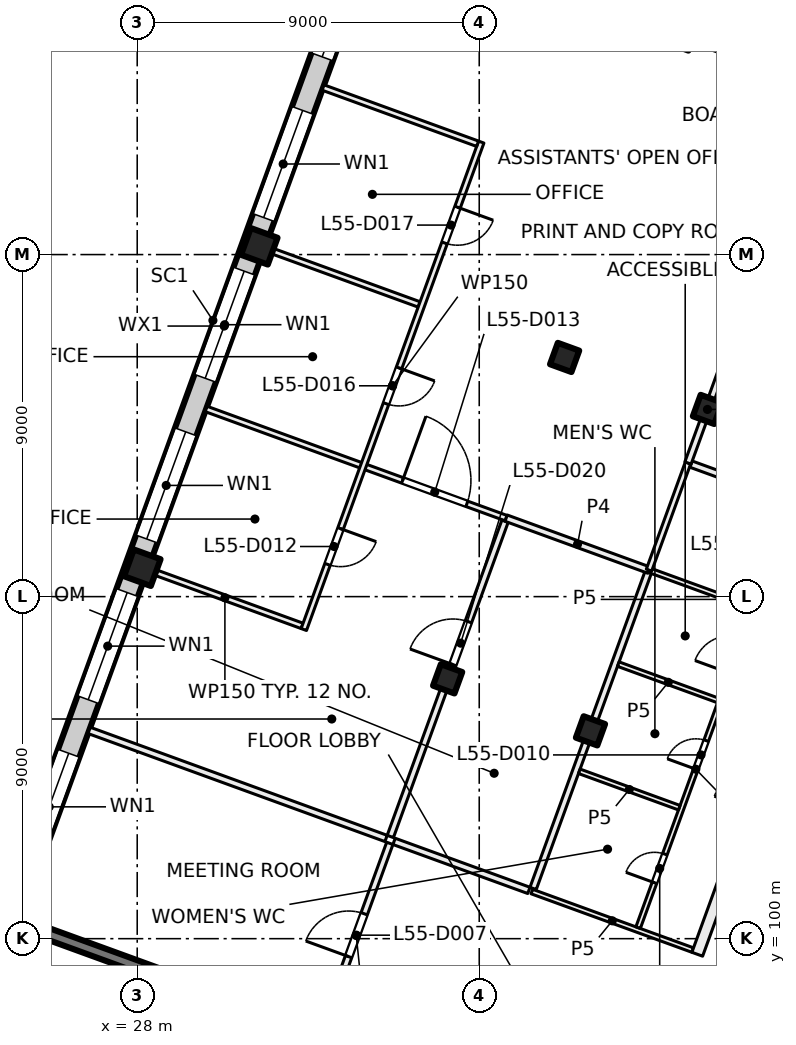
"""IFC4 building model, lengths in metres.
Left out: names, types, materials, properties, quantities, classifications, styles, units other than length and angle.
Written with IfcOpenShell. Run it as: python <this file> out.ifc"""

import sys

from ifc_helpers import new_model, si_unit, direction, frame, frame_2d, origin, origin_2d, place, context, subcontext, project, spatial, rectangle, extrude, element, fill, save


model = new_model("IFC4")
c1 = context("Model", 3, precision=1e-05, world=origin(), true_north=direction((0.0, 1.0)))
c2 = subcontext(c1, "Body", "Model", "MODEL_VIEW")
j1 = project(units=[si_unit("LENGTHUNIT", "METRE"), si_unit("PLANEANGLEUNIT", "RADIAN")], contexts=[c1])
p1 = place(None, origin())
s1 = spatial("IfcSite", under=j1, at=p1, CompositionType="ELEMENT")
p2 = place(p1, origin())
s2 = spatial("IfcBuilding", under=s1, at=p2, CompositionType="ELEMENT")
p3 = place(p2, frame((0.0, 0.0, 232.0)))
s3 = spatial("IfcBuildingStorey", under=s2, at=p3, CompositionType="ELEMENT", Elevation=232.0)
for number, where, z_axis, x_axis in (
    (1, (43.006, 113.925, 0.0), (0.0, 0.0, 1.0), (-0.342, -0.94, 0.0)),
    (2, (39.927, 105.468, 0.0), (0.0, 0.0, 1.0), (-0.342, -0.94, 0.0)),
    (3, (39.247, 115.293, 0.0), (0.0, 0.0, 1.0), (-0.342, -0.94, 0.0)),
    (4, (36.169, 106.836, 0.0), (0.0, 0.0, 1.0), (-0.342, -0.94, 0.0)),
):
    element("IfcColumn", number, at=place(p3, frame(where, z_axis=z_axis, x_axis=x_axis)), inside=s3, PredefinedType="COLUMN", context=c2, shape_type="SweptSolid", body=[
        extrude(rectangle(XDim=0.6, YDim=0.6, at=origin_2d()), origin(), (0.0, 0.0, 1.0), 4.0),
    ])
for number, where, z_axis, x_axis in (
    (5, (31.212, 118.218, 0.0), (0.0, 0.0, 1.0), (-0.342, -0.94, 0.0)),
    (6, (28.134, 109.76, 0.0), (0.0, 0.0, 1.0), (-0.342, -0.94, 0.0)),
):
    element("IfcColumn", number, at=place(p3, frame(where, z_axis=z_axis, x_axis=x_axis)), inside=s3, PredefinedType="COLUMN", context=c2, shape_type="SweptSolid", body=[
        extrude(rectangle(XDim=0.75, YDim=0.75, at=origin_2d()), origin(), (0.0, 0.0, 1.0), 4.0),
    ])
p4 = place(p3, frame((32.971, 97.465, 0.0), z_axis=(0.0, 0.0, 1.0), x_axis=(-0.939695066972, 0.34201342241, 0.0)))
e7 = element("IfcWall", 7, at=p4, inside=s3, PredefinedType="SHEAR", context=c2, shape_type="SweptSolid", body=[
    extrude(rectangle(XDim=8.7, YDim=0.3, at=frame_2d((4.35, 0.0))), origin(), (0.0, 0.0, 1.0), 4.0),
])
p5 = place(p3, frame((24.666, 100.669, 0.0), z_axis=(0.0, 0.0, 1.0), x_axis=(0.34201964167, 0.939692803373, 0.0)))
e8 = element("IfcWall", 8, at=p5, inside=s3, PredefinedType="SOLIDWALL", context=c2, shape_type="SweptSolid", body=[
    extrude(rectangle(XDim=32.884, YDim=0.6, at=frame_2d((16.442, 0.0))), origin(), (0.0, 0.0, 1.0), 3.625),
])
p6 = place(p5, frame((1.48, 0.0, 0.9)))
e9 = element("IfcOpeningElement", 9, at=p6, cuts=e8, PredefinedType="OPENING", context=c2, shape_type="SweptSolid", body=[
    extrude(rectangle(XDim=3.0, YDim=2.4, at=frame_2d((1.5, 1.2))), frame((0.0, 0.31, 0.0), z_axis=(0.0, -1.0, 0.0), x_axis=(1.0, 0.0, 0.0)), (0.0, 0.0, 1.0), 0.62),
])
p7 = place(p5, frame((5.98, 0.0, 0.9)))
e10 = element("IfcOpeningElement", 10, at=p7, cuts=e8, PredefinedType="OPENING", context=c2, shape_type="SweptSolid", body=[
    extrude(rectangle(XDim=3.0, YDim=2.4, at=frame_2d((1.5, 1.2))), frame((0.0, 0.31, 0.0), z_axis=(0.0, -1.0, 0.0), x_axis=(1.0, 0.0, 0.0)), (0.0, 0.0, 1.0), 0.62),
])
p8 = place(p5, frame((10.48, 0.0, 0.9)))
e11 = element("IfcOpeningElement", 11, at=p8, cuts=e8, PredefinedType="OPENING", context=c2, shape_type="SweptSolid", body=[
    extrude(rectangle(XDim=3.0, YDim=2.4, at=frame_2d((1.5, 1.2))), frame((0.0, 0.31, 0.0), z_axis=(0.0, -1.0, 0.0), x_axis=(1.0, 0.0, 0.0)), (0.0, 0.0, 1.0), 0.62),
])
p9 = place(p5, frame((14.98, 0.0, 0.9)))
e12 = element("IfcOpeningElement", 12, at=p9, cuts=e8, PredefinedType="OPENING", context=c2, shape_type="SweptSolid", body=[
    extrude(rectangle(XDim=3.0, YDim=2.4, at=frame_2d((1.5, 1.2))), frame((0.0, 0.31, 0.0), z_axis=(0.0, -1.0, 0.0), x_axis=(1.0, 0.0, 0.0)), (0.0, 0.0, 1.0), 0.62),
])
p10 = place(p5, frame((19.48, 0.0, 0.9)))
e13 = element("IfcOpeningElement", 13, at=p10, cuts=e8, PredefinedType="OPENING", context=c2, shape_type="SweptSolid", body=[
    extrude(rectangle(XDim=3.0, YDim=2.4, at=frame_2d((1.5, 1.2))), frame((0.0, 0.31, 0.0), z_axis=(0.0, -1.0, 0.0), x_axis=(1.0, 0.0, 0.0)), (0.0, 0.0, 1.0), 0.62),
])
p11 = place(p5, frame((23.98, 0.0, 0.9)))
e14 = element("IfcOpeningElement", 14, at=p11, cuts=e8, PredefinedType="OPENING", context=c2, shape_type="SweptSolid", body=[
    extrude(rectangle(XDim=3.0, YDim=2.4, at=frame_2d((1.5, 1.2))), frame((0.0, 0.31, 0.0), z_axis=(0.0, -1.0, 0.0), x_axis=(1.0, 0.0, 0.0)), (0.0, 0.0, 1.0), 0.62),
])
p12 = place(p5, frame((28.48, 0.0, 0.9)))
e15 = element("IfcOpeningElement", 15, at=p12, cuts=e8, PredefinedType="OPENING", context=c2, shape_type="SweptSolid", body=[
    extrude(rectangle(XDim=3.0, YDim=2.4, at=frame_2d((1.5, 1.2))), frame((0.0, 0.31, 0.0), z_axis=(0.0, -1.0, 0.0), x_axis=(1.0, 0.0, 0.0)), (0.0, 0.0, 1.0), 0.62),
])
p13 = place(p3, frame((26.736, 105.48, 0.0), z_axis=(0.0, 0.0, 1.0), x_axis=(0.939705074886, -0.341985924028, 0.0)))
e16 = element("IfcWall", 16, at=p13, inside=s3, PredefinedType="PARTITIONING", context=c2, shape_type="SweptSolid", body=[
    extrude(rectangle(XDim=8.313, YDim=0.175, at=frame_2d((4.157, 0.0))), origin(), (0.0, 0.0, 1.0), 3.625),
])
p14 = place(p3, frame((29.814, 113.938, 0.0), z_axis=(0.0, 0.0, 1.0), x_axis=(0.939698351515, -0.342004397867, 0.0)))
e17 = element("IfcWall", 17, at=p14, inside=s3, PredefinedType="PARTITIONING", context=c2, shape_type="SweptSolid", body=[
    extrude(rectangle(XDim=8.401, YDim=0.15, at=frame_2d((4.2, 0.0))), origin(), (0.0, 0.0, 1.0), 3.625),
])
p15 = place(p14, frame((5.5, 0.0, 0.0)))
e18 = element("IfcOpeningElement", 18, at=p15, cuts=e17, PredefinedType="OPENING", context=c2, shape_type="SweptSolid", body=[
    extrude(rectangle(XDim=1.8, YDim=2.1, at=frame_2d((0.9, 1.05))), frame((0.0, 0.085, 0.0), z_axis=(0.0, -1.0, 0.0), x_axis=(1.0, 0.0, 0.0)), (0.0, 0.0, 1.0), 0.17),
])
p16 = place(p3, frame((31.353, 118.166, 0.0), z_axis=(0.0, 0.0, 1.0), x_axis=(0.939803311208, -0.341715870634, 0.0)))
e19 = element("IfcWall", 19, at=p16, inside=s3, PredefinedType="PARTITIONING", context=c2, shape_type="SweptSolid", body=[
    extrude(rectangle(XDim=4.325, YDim=0.15, at=frame_2d((2.163, 0.0))), origin(), (0.0, 0.0, 1.0), 3.625),
])
p17 = place(p3, frame((32.34, 108.23, 0.0), z_axis=(0.0, 0.0, 1.0), x_axis=(-0.939737385516, 0.341897128188, 0.0)))
e20 = element("IfcWall", 20, at=p17, inside=s3, PredefinedType="PARTITIONING", context=c2, shape_type="SweptSolid", body=[
    extrude(rectangle(XDim=4.326, YDim=0.15, at=frame_2d((2.163, 0.0))), origin(), (0.0, 0.0, 1.0), 3.625),
])
p18 = place(p3, frame((37.053, 120.96, 0.0), z_axis=(0.0, 0.0, 1.0), x_axis=(-0.342064742067, -0.939676386973, 0.0)))
e21 = element("IfcWall", 21, at=p18, inside=s3, PredefinedType="PARTITIONING", context=c2, shape_type="SweptSolid", body=[
    extrude(rectangle(XDim=13.649, YDim=0.15, at=frame_2d((6.825, 0.0))), origin(), (0.0, 0.0, 1.0), 3.625),
])
p19 = place(p18, frame((10.824, 0.0, 0.0)))
e22 = element("IfcOpeningElement", 22, at=p19, cuts=e21, PredefinedType="OPENING", context=c2, shape_type="SweptSolid", body=[
    extrude(rectangle(XDim=1.0, YDim=2.1, at=frame_2d((0.5, 1.05))), frame((0.0, 0.085, 0.0), z_axis=(0.0, -1.0, 0.0), x_axis=(1.0, 0.0, 0.0)), (0.0, 0.0, 1.0), 0.17),
])
p20 = place(p18, frame((6.324, 0.0, 0.0)))
e23 = element("IfcOpeningElement", 23, at=p20, cuts=e21, PredefinedType="OPENING", context=c2, shape_type="SweptSolid", body=[
    extrude(rectangle(XDim=1.0, YDim=2.1, at=frame_2d((0.5, 1.05))), frame((0.0, 0.085, 0.0), z_axis=(0.0, -1.0, 0.0), x_axis=(1.0, 0.0, 0.0)), (0.0, 0.0, 1.0), 0.17),
])
p21 = place(p18, frame((1.824, 0.0, 0.0)))
e24 = element("IfcOpeningElement", 24, at=p21, cuts=e21, PredefinedType="OPENING", context=c2, shape_type="SweptSolid", body=[
    extrude(rectangle(XDim=1.0, YDim=2.1, at=frame_2d((0.5, 1.05))), frame((0.0, 0.085, 0.0), z_axis=(0.0, -1.0, 0.0), x_axis=(1.0, 0.0, 0.0)), (0.0, 0.0, 1.0), 0.17),
])
p22 = place(p3, frame((32.892, 122.395, 0.0), z_axis=(0.0, 0.0, 1.0), x_axis=(0.93973078783, -0.341915262023, 0.0)))
e25 = element("IfcWall", 25, at=p22, inside=s3, PredefinedType="PARTITIONING", context=c2, shape_type="SweptSolid", body=[
    extrude(rectangle(XDim=4.326, YDim=0.15, at=frame_2d((2.163, 0.0))), origin(), (0.0, 0.0, 1.0), 3.625),
])
p23 = place(p3, frame((32.881, 97.657, 0.0), z_axis=(0.0, 0.0, 1.0), x_axis=(0.342058204353, 0.939678766832, 0.0)))
e26 = element("IfcWall", 26, at=p23, inside=s3, PredefinedType="PARTITIONING", context=c2, shape_type="SweptSolid", body=[
    extrude(rectangle(XDim=5.163, YDim=0.175, at=frame_2d((2.581, 0.0))), origin(), (0.0, 0.0, 1.0), 3.625),
])
p24 = place(p23, frame((1.991, 0.0, 0.0)))
e27 = element("IfcOpeningElement", 27, at=p24, cuts=e26, PredefinedType="OPENING", context=c2, shape_type="SweptSolid", body=[
    extrude(rectangle(XDim=1.2, YDim=2.1, at=frame_2d((0.6, 1.05))), frame((0.0, 0.097, 0.0), z_axis=(0.0, -1.0, 0.0), x_axis=(1.0, 0.0, 0.0)), (0.0, 0.0, 1.0), 0.195),
])
p25 = place(p3, frame((34.759, 102.56, 0.0), z_axis=(0.0, 0.0, 1.0), x_axis=(0.939770757411, -0.341805388365, 0.0)))
e28 = element("IfcWall", 28, at=p25, inside=s3, PredefinedType="PARTITIONING", context=c2, shape_type="SweptSolid", body=[
    extrude(rectangle(XDim=3.774, YDim=0.175, at=frame_2d((1.887, 0.0))), origin(), (0.0, 0.0, 1.0), 3.625),
])
p26 = place(p3, frame((34.66, 102.689, 0.0), z_axis=(0.0, 0.0, 1.0), x_axis=(0.341951828534, 0.939717482524, 0.0)))
e29 = element("IfcWall", 29, at=p26, inside=s3, PredefinedType="PARTITIONING", context=c2, shape_type="SweptSolid", body=[
    extrude(rectangle(XDim=8.826, YDim=0.175, at=frame_2d((4.413, 0.0))), origin(), (0.0, 0.0, 1.0), 3.625),
])
p27 = place(p26, frame((4.813, 0.0, 0.0)))
e30 = element("IfcOpeningElement", 30, at=p27, cuts=e29, PredefinedType="OPENING", context=c2, shape_type="SweptSolid", body=[
    extrude(rectangle(XDim=1.2, YDim=2.1, at=frame_2d((0.6, 1.05))), frame((0.0, 0.097, 0.0), z_axis=(0.0, -1.0, 0.0), x_axis=(1.0, 0.0, 0.0)), (0.0, 0.0, 1.0), 0.195),
])
p28 = place(p3, frame((38.385, 101.24, 0.0), z_axis=(0.0, 0.0, 1.0), x_axis=(0.939711088937, -0.341969398235, 0.0)))
e31 = element("IfcWall", 31, at=p28, inside=s3, PredefinedType="PARTITIONING", context=c2, shape_type="SweptSolid", body=[
    extrude(rectangle(XDim=4.503, YDim=0.125, at=frame_2d((2.252, 0.0))), origin(), (0.0, 0.0, 1.0), 3.625),
])
p29 = place(p3, frame((38.418, 101.322, 0.0), z_axis=(0.0, 0.0, 1.0), x_axis=(0.342101536507, 0.939662992099, 0.0)))
e32 = element("IfcWall", 32, at=p29, inside=s3, PredefinedType="PARTITIONING", context=c2, shape_type="SweptSolid", body=[
    extrude(rectangle(XDim=8.913, YDim=0.175, at=frame_2d((4.457, 0.0))), origin(), (0.0, 0.0, 1.0), 3.625),
])
p30 = place(p3, frame((41.181, 100.29, 0.0), z_axis=(0.0, 0.0, 1.0), x_axis=(0.34222012082, 0.939619810831, 0.0)))
e33 = element("IfcWall", 33, at=p30, inside=s3, PredefinedType="PARTITIONING", context=c2, shape_type="SweptSolid", body=[
    extrude(rectangle(XDim=8.875, YDim=0.125, at=frame_2d((4.438, 0.0))), origin(), (0.0, 0.0, 1.0), 3.625),
])
p31 = place(p30, frame((1.258, 0.0, 0.0)))
e34 = element("IfcOpeningElement", 34, at=p31, cuts=e33, PredefinedType="OPENING", context=c2, shape_type="SweptSolid", body=[
    extrude(rectangle(XDim=0.8, YDim=2.1, at=frame_2d((0.4, 1.05))), frame((0.0, 0.073, 0.0), z_axis=(0.0, -1.0, 0.0), x_axis=(1.0, 0.0, 0.0)), (0.0, 0.0, 1.0), 0.145),
])
p32 = place(p30, frame((4.437, 0.0, 0.0)))
e35 = element("IfcOpeningElement", 35, at=p32, cuts=e33, PredefinedType="OPENING", context=c2, shape_type="SweptSolid", body=[
    extrude(rectangle(XDim=0.8, YDim=2.1, at=frame_2d((0.4, 1.05))), frame((0.0, 0.073, 0.0), z_axis=(0.0, -1.0, 0.0), x_axis=(1.0, 0.0, 0.0)), (0.0, 0.0, 1.0), 0.145),
])
p33 = place(p30, frame((7.116, 0.0, 0.0)))
e36 = element("IfcOpeningElement", 36, at=p33, cuts=e33, PredefinedType="OPENING", context=c2, shape_type="SweptSolid", body=[
    extrude(rectangle(XDim=1.0, YDim=2.1, at=frame_2d((0.5, 1.05))), frame((0.0, 0.073, 0.0), z_axis=(0.0, -1.0, 0.0), x_axis=(1.0, 0.0, 0.0)), (0.0, 0.0, 1.0), 0.145),
])
p34 = place(p3, frame((41.467, 109.697, 0.0), z_axis=(0.0, 0.0, 1.0), x_axis=(-0.939713209288, 0.341963571582, 0.0)))
e37 = element("IfcWall", 37, at=p34, inside=s3, PredefinedType="PARTITIONING", context=c2, shape_type="SweptSolid", body=[
    extrude(rectangle(XDim=4.0, YDim=0.175, at=frame_2d((2.0, 0.0))), origin(), (0.0, 0.0, 1.0), 3.625),
])
p35 = place(p3, frame((41.467, 109.697, 0.0), z_axis=(0.0, 0.0, 1.0), x_axis=(0.939609529273, -0.342248349154, 0.0)))
e38 = element("IfcWall", 38, at=p35, inside=s3, PredefinedType="PARTITIONING", context=c2, shape_type="SweptSolid", body=[
    extrude(rectangle(XDim=4.5, YDim=0.125, at=frame_2d((2.25, 0.0))), origin(), (0.0, 0.0, 1.0), 3.625),
])
p36 = place(p3, frame((42.264, 103.446, 0.0), z_axis=(0.0, 0.0, 1.0), x_axis=(-0.939640574808, 0.342163104635, 0.0)))
e39 = element("IfcWall", 39, at=p36, inside=s3, PredefinedType="PARTITIONING", context=c2, shape_type="SweptSolid", body=[
    extrude(rectangle(XDim=2.8, YDim=0.125, at=frame_2d((1.4, 0.0))), origin(), (0.0, 0.0, 1.0), 3.625),
])
p37 = place(p3, frame((42.493, 112.516, 0.0), z_axis=(0.0, 0.0, 1.0), x_axis=(-0.341965219194, -0.939712609717, 0.0)))
e40 = element("IfcWall", 40, at=p37, inside=s3, PredefinedType="PARTITIONING", context=c2, shape_type="SweptSolid", body=[
    extrude(rectangle(XDim=3.0, YDim=0.15, at=frame_2d((1.5, 0.0))), origin(), (0.0, 0.0, 1.0), 3.625),
])
p38 = place(p3, frame((42.575, 112.486, 0.0), z_axis=(0.0, 0.0, 1.0), x_axis=(0.939620446327, -0.342218375959, 0.0)))
e41 = element("IfcWall", 41, at=p38, inside=s3, PredefinedType="PARTITIONING", context=c2, shape_type="SweptSolid", body=[
    extrude(rectangle(XDim=4.412, YDim=0.175, at=frame_2d((2.206, 0.0))), origin(), (0.0, 0.0, 1.0), 3.625),
])
p39 = place(p3, frame((42.737, 99.59, 0.0), z_axis=(0.0, 0.0, 1.0), x_axis=(0.341992703977, 0.939702607438, 0.0)))
e42 = element("IfcWall", 42, at=p39, inside=s3, PredefinedType="PARTITIONING", context=c2, shape_type="SweptSolid", body=[
    extrude(rectangle(XDim=23.006, YDim=0.3, at=frame_2d((11.503, 0.0))), origin(), (0.0, 0.0, 1.0), 3.625),
])
p40 = place(p39, frame((4.062, 0.0, 0.0)))
e43 = element("IfcOpeningElement", 43, at=p40, cuts=e42, PredefinedType="OPENING", context=c2, shape_type="SweptSolid", body=[
    extrude(rectangle(XDim=1.0, YDim=2.1, at=frame_2d((0.5, 1.05))), frame((0.0, 0.16, 0.0), z_axis=(0.0, -1.0, 0.0), x_axis=(1.0, 0.0, 0.0)), (0.0, 0.0, 1.0), 0.32),
])
p41 = place(p39, frame((10.162, 0.0, 0.0)))
e44 = element("IfcOpeningElement", 44, at=p41, cuts=e42, PredefinedType="OPENING", context=c2, shape_type="SweptSolid", body=[
    extrude(rectangle(XDim=0.8, YDim=2.1, at=frame_2d((0.4, 1.05))), frame((0.0, 0.16, 0.0), z_axis=(0.0, -1.0, 0.0), x_axis=(1.0, 0.0, 0.0)), (0.0, 0.0, 1.0), 0.32),
])
p42 = place(p39, frame((13.712, 0.0, 0.0)))
e45 = element("IfcOpeningElement", 45, at=p42, cuts=e42, PredefinedType="OPENING", context=c2, shape_type="SweptSolid", body=[
    extrude(rectangle(XDim=1.2, YDim=2.1, at=frame_2d((0.6, 1.05))), frame((0.0, 0.16, 0.0), z_axis=(0.0, -1.0, 0.0), x_axis=(1.0, 0.0, 0.0)), (0.0, 0.0, 1.0), 0.32),
])
p43 = place(p39, frame((18.662, 0.0, 0.0)))
e46 = element("IfcOpeningElement", 46, at=p43, cuts=e42, PredefinedType="OPENING", context=c2, shape_type="SweptSolid", body=[
    extrude(rectangle(XDim=1.8, YDim=2.1, at=frame_2d((0.9, 1.05))), frame((0.0, 0.16, 0.0), z_axis=(0.0, -1.0, 0.0), x_axis=(1.0, 0.0, 0.0)), (0.0, 0.0, 1.0), 0.32),
])
p44 = place(p3, frame((43.29, 106.266, 0.0), z_axis=(0.0, 0.0, 1.0), x_axis=(-0.939650782256, 0.342135071873, 0.0)))
e47 = element("IfcWall", 47, at=p44, inside=s3, PredefinedType="PARTITIONING", context=c2, shape_type="SweptSolid", body=[
    extrude(rectangle(XDim=2.8, YDim=0.125, at=frame_2d((1.4, 0.0))), origin(), (0.0, 0.0, 1.0), 3.625),
])
p45 = place(p3, frame((44.002, 116.662, 0.0), z_axis=(0.0, 0.0, 1.0), x_axis=(-0.342022951975, -0.939691598517, 0.0)))
e48 = element("IfcWall", 48, at=p45, inside=s3, PredefinedType="PARTITIONING", context=c2, shape_type="SweptSolid", body=[
    extrude(rectangle(XDim=4.412, YDim=0.175, at=frame_2d((2.206, 0.0))), origin(), (0.0, 0.0, 1.0), 3.625),
])
p46 = place(p3, frame((50.311, 120.843, 0.0), z_axis=(0.0, 0.0, 1.0), x_axis=(-0.939664702396, 0.342096838733, 0.0)))
e49 = element("IfcWall", 49, at=p46, inside=s3, PredefinedType="PARTITIONING", context=c2, shape_type="SweptSolid", body=[
    extrude(rectangle(XDim=16.899, YDim=0.15, at=frame_2d((8.449, 0.0))), origin(), (0.0, 0.0, 1.0), 3.625),
])
p47 = place(p6, origin())
e50 = element("IfcWindow", 50, at=p47, inside=s3, PartitioningType="SINGLE_PANEL", PredefinedType="WINDOW", context=c2, shape_type="SweptSolid", body=[
    extrude(rectangle(XDim=3.0, YDim=2.4, at=frame_2d((1.5, 1.2))), frame((0.0, 0.03, 0.0), z_axis=(0.0, -1.0, 0.0), x_axis=(1.0, 0.0, 0.0)), (0.0, 0.0, 1.0), 0.06),
])
fill(e9, e50)
p48 = place(p7, origin())
e51 = element("IfcWindow", 51, at=p48, inside=s3, PartitioningType="SINGLE_PANEL", PredefinedType="WINDOW", context=c2, shape_type="SweptSolid", body=[
    extrude(rectangle(XDim=3.0, YDim=2.4, at=frame_2d((1.5, 1.2))), frame((0.0, 0.03, 0.0), z_axis=(0.0, -1.0, 0.0), x_axis=(1.0, 0.0, 0.0)), (0.0, 0.0, 1.0), 0.06),
])
fill(e10, e51)
p49 = place(p8, origin())
e52 = element("IfcWindow", 52, at=p49, inside=s3, PartitioningType="SINGLE_PANEL", PredefinedType="WINDOW", context=c2, shape_type="SweptSolid", body=[
    extrude(rectangle(XDim=3.0, YDim=2.4, at=frame_2d((1.5, 1.2))), frame((0.0, 0.03, 0.0), z_axis=(0.0, -1.0, 0.0), x_axis=(1.0, 0.0, 0.0)), (0.0, 0.0, 1.0), 0.06),
])
fill(e11, e52)
p50 = place(p9, origin())
e53 = element("IfcWindow", 53, at=p50, inside=s3, PartitioningType="SINGLE_PANEL", PredefinedType="WINDOW", context=c2, shape_type="SweptSolid", body=[
    extrude(rectangle(XDim=3.0, YDim=2.4, at=frame_2d((1.5, 1.2))), frame((0.0, 0.03, 0.0), z_axis=(0.0, -1.0, 0.0), x_axis=(1.0, 0.0, 0.0)), (0.0, 0.0, 1.0), 0.06),
])
fill(e12, e53)
p51 = place(p10, origin())
e54 = element("IfcWindow", 54, at=p51, inside=s3, PartitioningType="SINGLE_PANEL", PredefinedType="WINDOW", context=c2, shape_type="SweptSolid", body=[
    extrude(rectangle(XDim=3.0, YDim=2.4, at=frame_2d((1.5, 1.2))), frame((0.0, 0.03, 0.0), z_axis=(0.0, -1.0, 0.0), x_axis=(1.0, 0.0, 0.0)), (0.0, 0.0, 1.0), 0.06),
])
fill(e13, e54)
p52 = place(p11, origin())
e55 = element("IfcWindow", 55, at=p52, inside=s3, PartitioningType="SINGLE_PANEL", PredefinedType="WINDOW", context=c2, shape_type="SweptSolid", body=[
    extrude(rectangle(XDim=3.0, YDim=2.4, at=frame_2d((1.5, 1.2))), frame((0.0, 0.03, 0.0), z_axis=(0.0, -1.0, 0.0), x_axis=(1.0, 0.0, 0.0)), (0.0, 0.0, 1.0), 0.06),
])
fill(e14, e55)
p53 = place(p24, origin())
e56 = element("IfcDoor", 56, at=p53, inside=s3, OperationType="DOUBLE_DOOR_SINGLE_SWING", PredefinedType="DOOR", context=c2, shape_type="SweptSolid", body=[
    extrude(rectangle(XDim=1.2, YDim=2.1, at=frame_2d((0.6, 1.05))), frame((0.0, 0.025, 0.0), z_axis=(0.0, -1.0, 0.0), x_axis=(1.0, 0.0, 0.0)), (0.0, 0.0, 1.0), 0.05),
])
fill(e27, e56)
p54 = place(p31, origin())
e57 = element("IfcDoor", 57, at=p54, inside=s3, OperationType="SINGLE_SWING_LEFT", PredefinedType="DOOR", context=c2, shape_type="SweptSolid", body=[
    extrude(rectangle(XDim=0.8, YDim=2.1, at=frame_2d((0.4, 1.05))), frame((0.0, 0.025, 0.0), z_axis=(0.0, -1.0, 0.0), x_axis=(1.0, 0.0, 0.0)), (0.0, 0.0, 1.0), 0.05),
])
fill(e34, e57)
p55 = place(p32, origin())
e58 = element("IfcDoor", 58, at=p55, inside=s3, OperationType="SINGLE_SWING_LEFT", PredefinedType="DOOR", context=c2, shape_type="SweptSolid", body=[
    extrude(rectangle(XDim=0.8, YDim=2.1, at=frame_2d((0.4, 1.05))), frame((0.0, 0.025, 0.0), z_axis=(0.0, -1.0, 0.0), x_axis=(1.0, 0.0, 0.0)), (0.0, 0.0, 1.0), 0.05),
])
fill(e35, e58)
p56 = place(p19, origin())
e59 = element("IfcDoor", 59, at=p56, inside=s3, OperationType="SINGLE_SWING_LEFT", PredefinedType="DOOR", context=c2, shape_type="SweptSolid", body=[
    extrude(rectangle(XDim=1.0, YDim=2.1, at=frame_2d((0.5, 1.05))), frame((0.0, 0.025, 0.0), z_axis=(0.0, -1.0, 0.0), x_axis=(1.0, 0.0, 0.0)), (0.0, 0.0, 1.0), 0.05),
])
fill(e22, e59)
p57 = place(p15, origin())
e60 = element("IfcDoor", 60, at=p57, inside=s3, OperationType="DOUBLE_DOOR_SINGLE_SWING", PredefinedType="DOOR", context=c2, shape_type="SweptSolid", body=[
    extrude(rectangle(XDim=1.8, YDim=2.1, at=frame_2d((0.9, 1.05))), frame((0.0, 0.025, 0.0), z_axis=(0.0, -1.0, 0.0), x_axis=(1.0, 0.0, 0.0)), (0.0, 0.0, 1.0), 0.05),
])
fill(e18, e60)
p58 = place(p20, origin())
e61 = element("IfcDoor", 61, at=p58, inside=s3, OperationType="SINGLE_SWING_RIGHT", PredefinedType="DOOR", context=c2, shape_type="SweptSolid", body=[
    extrude(rectangle(XDim=1.0, YDim=2.1, at=frame_2d((0.5, 1.05))), frame((0.0, 0.025, 0.0), z_axis=(0.0, -1.0, 0.0), x_axis=(1.0, 0.0, 0.0)), (0.0, 0.0, 1.0), 0.05),
])
fill(e23, e61)
p59 = place(p21, origin())
e62 = element("IfcDoor", 62, at=p59, inside=s3, OperationType="SINGLE_SWING_LEFT", PredefinedType="DOOR", context=c2, shape_type="SweptSolid", body=[
    extrude(rectangle(XDim=1.0, YDim=2.1, at=frame_2d((0.5, 1.05))), frame((0.0, 0.025, 0.0), z_axis=(0.0, -1.0, 0.0), x_axis=(1.0, 0.0, 0.0)), (0.0, 0.0, 1.0), 0.05),
])
fill(e24, e62)
p60 = place(p27, origin())
e63 = element("IfcDoor", 63, at=p60, inside=s3, OperationType="DOUBLE_DOOR_SINGLE_SWING", PredefinedType="DOOR", context=c2, shape_type="SweptSolid", body=[
    extrude(rectangle(XDim=1.2, YDim=2.1, at=frame_2d((0.6, 1.05))), frame((0.0, 0.025, 0.0), z_axis=(0.0, -1.0, 0.0), x_axis=(1.0, 0.0, 0.0)), (0.0, 0.0, 1.0), 0.05),
])
fill(e30, e63)
save(model, sys.argv[1])
